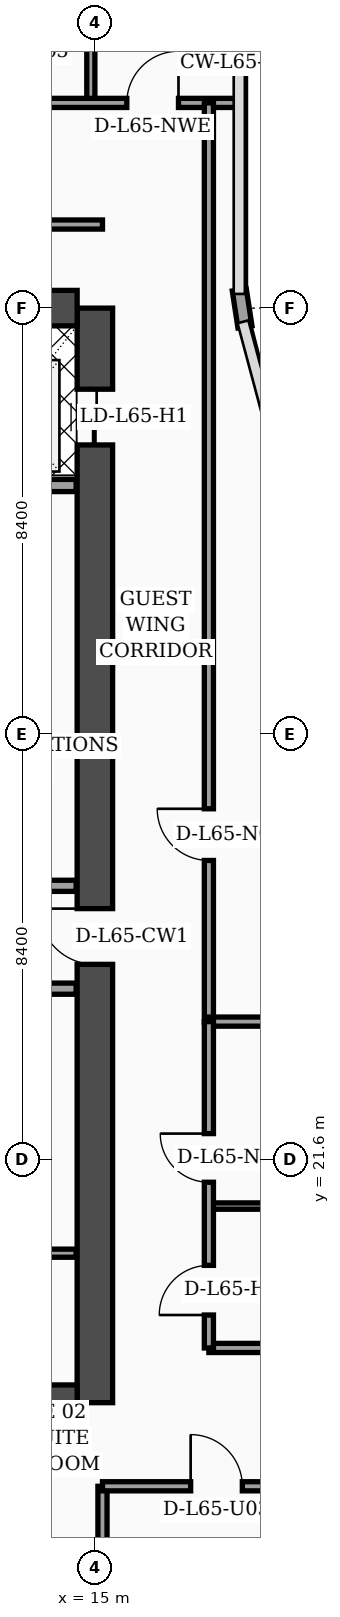
"""IFC4 building model, lengths in metres.
Left out: names, types, materials, properties, quantities, classifications, styles, units other than length and angle.
Written with IfcOpenShell. Run it as: python <this file> out.ifc"""

import sys

from ifc_helpers import new_model, si_unit, direction, frame, frame_2d, origin, place, context, subcontext, project, spatial, rectangle, extrude, element, fill, save


model = new_model("IFC4")
c1 = context("Model", 3, precision=1e-05, world=origin(), true_north=direction((0.0, 1.0)))
c2 = subcontext(c1, "Body", "Model", "MODEL_VIEW")
j1 = project(units=[si_unit("LENGTHUNIT", "METRE"), si_unit("PLANEANGLEUNIT", "RADIAN")], contexts=[c1])
p1 = place(None, origin())
s1 = spatial("IfcSite", under=j1, at=p1, CompositionType="ELEMENT")
p2 = place(p1, origin())
s2 = spatial("IfcBuilding", under=s1, at=p2, CompositionType="ELEMENT")
p3 = place(p2, frame((0.0, 0.0, 263.5)))
s3 = spatial("IfcBuildingStorey", under=s2, at=p3, CompositionType="ELEMENT", Elevation=263.5)
p4 = place(p3, frame((15.0, 16.8, 0.0), z_axis=(0.0, 0.0, 1.0), x_axis=(0.0, 1.0, 0.0)))
e1 = element("IfcWall", 1, at=p4, inside=s3, PredefinedType="SHEAR", context=c2, shape_type="SweptSolid", body=[
    extrude(rectangle(XDim=21.6, YDim=0.7, at=frame_2d((10.8, 0.0))), origin(), (0.0, 0.0, 1.0), 3.56),
])
p5 = place(p4, frame((8.65, 0.0, 0.0)))
e2 = element("IfcOpeningElement", 2, at=p5, cuts=e1, PredefinedType="OPENING", context=c2, shape_type="SweptSolid", body=[
    extrude(rectangle(XDim=1.1, YDim=2.2, at=frame_2d((0.55, 1.1))), frame((0.0, 0.36, 0.0), z_axis=(0.0, -1.0, 0.0), x_axis=(1.0, 0.0, 0.0)), (0.0, 0.0, 1.0), 0.72),
])
p6 = place(p4, frame((18.9, 0.0, 0.0)))
e3 = element("IfcOpeningElement", 3, at=p6, cuts=e1, PredefinedType="OPENING", context=c2, shape_type="SweptSolid", body=[
    extrude(rectangle(XDim=1.1, YDim=2.2, at=frame_2d((0.55, 1.1))), frame((0.0, 0.36, 0.0), z_axis=(0.0, -1.0, 0.0), x_axis=(1.0, 0.0, 0.0)), (0.0, 0.0, 1.0), 0.72),
])
p7 = place(p3, frame((4.55, 38.4, 0.0), z_axis=(0.0, 0.0, 1.0), x_axis=(1.0, 0.0, 0.0)))
e4 = element("IfcWall", 4, at=p7, inside=s3, PredefinedType="SHEAR", context=c2, shape_type="SweptSolid", body=[
    extrude(rectangle(XDim=10.1, YDim=0.7, at=frame_2d((5.05, 0.0))), origin(), (0.0, 0.0, 1.0), 3.56),
])
p8 = place(p7, frame((5.75, 0.0, 0.0)))
e5 = element("IfcOpeningElement", 5, at=p8, cuts=e4, PredefinedType="OPENING", context=c2, shape_type="SweptSolid", body=[
    extrude(rectangle(XDim=1.1, YDim=2.2, at=frame_2d((0.55, 1.1))), frame((0.0, 0.36, 0.0), z_axis=(0.0, -1.0, 0.0), x_axis=(1.0, 0.0, 0.0)), (0.0, 0.0, 1.0), 0.72),
])
p9 = place(p3, frame((4.55, 16.8, 0.0), z_axis=(0.0, 0.0, 1.0), x_axis=(1.0, 0.0, 0.0)))
e6 = element("IfcWall", 6, at=p9, inside=s3, PredefinedType="SHEAR", context=c2, shape_type="SweptSolid", body=[
    extrude(rectangle(XDim=10.1, YDim=0.7, at=frame_2d((5.05, 0.0))), origin(), (0.0, 0.0, 1.0), 3.56),
])
p10 = place(p3, frame((17.962, 38.03, 0.0), z_axis=(0.0, 0.0, 1.0), x_axis=(-0.15141125477, 0.988470855377, 0.0)))
e7 = element("IfcWall", 7, at=p10, inside=s3, PredefinedType="SOLIDWALL", context=c2, shape_type="SweptSolid", body=[
    extrude(rectangle(XDim=0.739, YDim=0.28, at=frame_2d((0.369, 0.0))), origin(), (0.0, 0.0, 1.0), 3.56),
])
p11 = place(p3, frame((9.68, 19.75, 0.0), z_axis=(0.0, 0.0, 1.0), x_axis=(1.0, 0.0, 0.0)))
e8 = element("IfcWall", 8, at=p11, inside=s3, PredefinedType="PARTITIONING", context=c2, shape_type="SweptSolid", body=[
    extrude(rectangle(XDim=4.95, YDim=0.16, at=frame_2d((2.475, 0.0))), origin(), (0.0, 0.0, 1.0), 3.56),
])
p12 = place(p11, frame((1.1, 0.0, 0.0)))
e9 = element("IfcOpeningElement", 9, at=p12, cuts=e8, PredefinedType="OPENING", context=c2, shape_type="SweptSolid", body=[
    extrude(rectangle(XDim=0.98, YDim=2.15, at=frame_2d((0.49, 1.075))), frame((0.0, 0.09, 0.0), z_axis=(0.0, -1.0, 0.0), x_axis=(1.0, 0.0, 0.0)), (0.0, 0.0, 1.0), 0.18),
])
p13 = place(p3, frame((9.68, 24.97, 0.0), z_axis=(0.0, 0.0, 1.0), x_axis=(1.0, 0.0, 0.0)))
e10 = element("IfcWall", 10, at=p13, inside=s3, PredefinedType="SOLIDWALL", context=c2, shape_type="SweptSolid", body=[
    extrude(rectangle(XDim=4.95, YDim=0.22, at=frame_2d((2.475, 0.0))), origin(), (0.0, 0.0, 1.0), 2.99),
])
p14 = place(p13, frame((0.9, 0.0, 0.0)))
e11 = element("IfcOpeningElement", 11, at=p14, cuts=e10, PredefinedType="OPENING", context=c2, shape_type="SweptSolid", body=[
    extrude(rectangle(XDim=0.98, YDim=2.15, at=frame_2d((0.49, 1.075))), frame((0.0, 0.12, 0.0), z_axis=(0.0, -1.0, 0.0), x_axis=(1.0, 0.0, 0.0)), (0.0, 0.0, 1.0), 0.24),
])
p15 = place(p3, frame((12.25, 27.0, 0.0), z_axis=(0.0, 0.0, 1.0), x_axis=(1.0, 0.0, 0.0)))
e12 = element("IfcWall", 12, at=p15, inside=s3, PredefinedType="SOLIDWALL", context=c2, shape_type="SweptSolid", body=[
    extrude(rectangle(XDim=2.38, YDim=0.22, at=frame_2d((1.19, 0.0))), origin(), (0.0, 0.0, 1.0), 3.56),
])
p16 = place(p3, frame((12.25, 29.8, 0.0), z_axis=(0.0, 0.0, 1.0), x_axis=(1.0, 0.0, 0.0)))
e13 = element("IfcWall", 13, at=p16, inside=s3, PredefinedType="PARTITIONING", context=c2, shape_type="SweptSolid", body=[
    extrude(rectangle(XDim=2.38, YDim=0.16, at=frame_2d((1.19, 0.0))), origin(), (0.0, 0.0, 1.0), 3.56),
])
p17 = place(p16, frame((0.55, 0.0, 0.0)))
e14 = element("IfcOpeningElement", 14, at=p17, cuts=e13, PredefinedType="OPENING", context=c2, shape_type="SweptSolid", body=[
    extrude(rectangle(XDim=0.98, YDim=2.15, at=frame_2d((0.49, 1.075))), frame((0.0, 0.09, 0.0), z_axis=(0.0, -1.0, 0.0), x_axis=(1.0, 0.0, 0.0)), (0.0, 0.0, 1.0), 0.18),
])
p18 = place(p3, frame((9.66, 34.9, 0.0), z_axis=(0.0, 0.0, 1.0), x_axis=(1.0, 0.0, 0.0)))
e15 = element("IfcWall", 15, at=p18, inside=s3, PredefinedType="SOLIDWALL", context=c2, shape_type="SweptSolid", body=[
    extrude(rectangle(XDim=4.97, YDim=0.24, at=frame_2d((2.485, 0.0))), origin(), (0.0, 0.0, 1.0), 3.56),
])
p19 = place(p3, frame((15.15, 2.44, 0.0), z_axis=(0.0, 0.0, 1.0), x_axis=(0.0, 1.0, 0.0)))
e16 = element("IfcWall", 16, at=p19, inside=s3, PredefinedType="PARTITIONING", context=c2, shape_type="SweptSolid", body=[
    extrude(rectangle(XDim=12.71, YDim=0.18, at=frame_2d((6.355, 0.0))), origin(), (0.0, 0.0, 1.0), 3.09),
])
p20 = place(p3, frame((15.15, 15.15, 0.0), z_axis=(0.0, 0.0, 1.0), x_axis=(1.0, 0.0, 0.0)))
e17 = element("IfcWall", 17, at=p20, inside=s3, PredefinedType="PARTITIONING", context=c2, shape_type="SweptSolid", body=[
    extrude(rectangle(XDim=6.45, YDim=0.18, at=frame_2d((3.225, 0.0))), origin(), (0.0, 0.0, 1.0), 2.59),
])
p21 = place(p20, frame((1.74, 0.0, 0.0)))
e18 = element("IfcOpeningElement", 18, at=p21, cuts=e17, PredefinedType="OPENING", context=c2, shape_type="SweptSolid", body=[
    extrude(rectangle(XDim=1.02, YDim=2.2, at=frame_2d((0.51, 1.1))), frame((0.0, 0.1, 0.0), z_axis=(0.0, -1.0, 0.0), x_axis=(1.0, 0.0, 0.0)), (0.0, 0.0, 1.0), 0.2),
])
p22 = place(p3, frame((14.92, 42.45, 0.0), z_axis=(0.0, 0.0, 1.0), x_axis=(0.0, 1.0, 0.0)))
e19 = element("IfcWall", 19, at=p22, inside=s3, PredefinedType="PARTITIONING", context=c2, shape_type="SweptSolid", body=[
    extrude(rectangle(XDim=5.35, YDim=0.16, at=frame_2d((2.675, 0.0))), origin(), (0.0, 0.0, 1.0), 3.09),
])
p23 = place(p3, frame((0.08, 42.45, 0.0), z_axis=(0.0, 0.0, 1.0), x_axis=(1.0, 0.0, 0.0)))
e20 = element("IfcWall", 20, at=p23, inside=s3, PredefinedType="PARTITIONING", context=c2, shape_type="SweptSolid", body=[
    extrude(rectangle(XDim=17.77, YDim=0.18, at=frame_2d((8.885, 0.0))), origin(), (0.0, 0.0, 1.0), 2.99),
])
p24 = place(p23, frame((0.9, 0.0, 0.0)))
e21 = element("IfcOpeningElement", 21, at=p24, cuts=e20, PredefinedType="OPENING", context=c2, shape_type="SweptSolid", body=[
    extrude(rectangle(XDim=1.02, YDim=2.2, at=frame_2d((0.51, 1.1))), frame((0.0, 0.1, 0.0), z_axis=(0.0, -1.0, 0.0), x_axis=(1.0, 0.0, 0.0)), (0.0, 0.0, 1.0), 0.2),
])
p25 = place(p23, frame((4.57, 0.0, 0.0)))
e22 = element("IfcOpeningElement", 22, at=p25, cuts=e20, PredefinedType="OPENING", context=c2, shape_type="SweptSolid", body=[
    extrude(rectangle(XDim=1.02, YDim=2.2, at=frame_2d((0.51, 1.1))), frame((0.0, 0.1, 0.0), z_axis=(0.0, -1.0, 0.0), x_axis=(1.0, 0.0, 0.0)), (0.0, 0.0, 1.0), 0.2),
])
p26 = place(p23, frame((10.46, 0.0, 0.0)))
e23 = element("IfcOpeningElement", 23, at=p26, cuts=e20, PredefinedType="OPENING", context=c2, shape_type="SweptSolid", body=[
    extrude(rectangle(XDim=1.02, YDim=2.2, at=frame_2d((0.51, 1.1))), frame((0.0, 0.1, 0.0), z_axis=(0.0, -1.0, 0.0), x_axis=(1.0, 0.0, 0.0)), (0.0, 0.0, 1.0), 0.2),
])
p27 = place(p23, frame((15.55, 0.0, 0.0)))
e24 = element("IfcOpeningElement", 24, at=p27, cuts=e20, PredefinedType="OPENING", context=c2, shape_type="SweptSolid", body=[
    extrude(rectangle(XDim=1.02, YDim=2.2, at=frame_2d((0.51, 1.1))), frame((0.0, 0.1, 0.0), z_axis=(0.0, -1.0, 0.0), x_axis=(1.0, 0.0, 0.0)), (0.0, 0.0, 1.0), 0.2),
])
p28 = place(p3, frame((17.25, 24.3, 0.0), z_axis=(0.0, 0.0, 1.0), x_axis=(0.0, 1.0, 0.0)))
e25 = element("IfcWall", 25, at=p28, inside=s3, PredefinedType="PARTITIONING", context=c2, shape_type="SweptSolid", body=[
    extrude(rectangle(XDim=18.15, YDim=0.18, at=frame_2d((9.075, 0.0))), origin(), (0.0, 0.0, 1.0), 2.99),
])
p29 = place(p28, frame((3.2, 0.0, 0.0)))
e26 = element("IfcOpeningElement", 26, at=p29, cuts=e25, PredefinedType="OPENING", context=c2, shape_type="SweptSolid", body=[
    extrude(rectangle(XDim=1.02, YDim=2.2, at=frame_2d((0.51, 1.1))), frame((0.0, 0.1, 0.0), z_axis=(0.0, -1.0, 0.0), x_axis=(1.0, 0.0, 0.0)), (0.0, 0.0, 1.0), 0.2),
])
p30 = place(p3, frame((3.83, 40.05, 0.0), z_axis=(0.0, 0.0, 1.0), x_axis=(1.0, 0.0, 0.0)))
e27 = element("IfcWall", 27, at=p30, inside=s3, PredefinedType="PARTITIONING", context=c2, shape_type="SweptSolid", body=[
    extrude(rectangle(XDim=11.32, YDim=0.18, at=frame_2d((5.66, 0.0))), origin(), (0.0, 0.0, 1.0), 2.99),
])
p31 = place(p3, frame((17.25, 17.88, 0.0), z_axis=(0.0, 0.0, 1.0), x_axis=(1.0, 0.0, 0.0)))
e28 = element("IfcWall", 28, at=p31, inside=s3, PredefinedType="PARTITIONING", context=c2, shape_type="SweptSolid", body=[
    extrude(rectangle(XDim=4.3, YDim=0.18, at=frame_2d((2.15, 0.0))), origin(), (0.0, 0.0, 1.0), 3.56),
])
p32 = place(p3, frame((17.25, 20.68, 0.0), z_axis=(0.0, 0.0, 1.0), x_axis=(1.0, 0.0, 0.0)))
e29 = element("IfcWall", 29, at=p32, inside=s3, PredefinedType="PARTITIONING", context=c2, shape_type="SweptSolid", body=[
    extrude(rectangle(XDim=4.3, YDim=0.125, at=frame_2d((2.15, 0.0))), origin(), (0.0, 0.0, 1.0), 3.56),
])
p33 = place(p3, frame((17.25, 24.32, 0.0), z_axis=(0.0, 0.0, 1.0), x_axis=(1.0, 0.0, 0.0)))
e30 = element("IfcWall", 30, at=p33, inside=s3, PredefinedType="PARTITIONING", context=c2, shape_type="SweptSolid", body=[
    extrude(rectangle(XDim=4.35, YDim=0.18, at=frame_2d((2.175, 0.0))), origin(), (0.0, 0.0, 1.0), 3.56),
])
p34 = place(p3, frame((17.25, 17.88, 0.0), z_axis=(0.0, 0.0, 1.0), x_axis=(0.0, 1.0, 0.0)))
e31 = element("IfcWall", 31, at=p34, inside=s3, PredefinedType="PARTITIONING", context=c2, shape_type="SweptSolid", body=[
    extrude(rectangle(XDim=6.44, YDim=0.18, at=frame_2d((3.22, 0.0))), origin(), (0.0, 0.0, 1.0), 3.56),
])
p35 = place(p34, frame((0.65, 0.0, 0.0)))
e32 = element("IfcOpeningElement", 32, at=p35, cuts=e31, PredefinedType="OPENING", context=c2, shape_type="SweptSolid", body=[
    extrude(rectangle(XDim=0.98, YDim=2.15, at=frame_2d((0.49, 1.075))), frame((0.0, 0.1, 0.0), z_axis=(0.0, -1.0, 0.0), x_axis=(1.0, 0.0, 0.0)), (0.0, 0.0, 1.0), 0.2),
])
p36 = place(p34, frame((3.27, 0.0, 0.0)))
e33 = element("IfcOpeningElement", 33, at=p36, cuts=e31, PredefinedType="OPENING", context=c2, shape_type="SweptSolid", body=[
    extrude(rectangle(XDim=0.96, YDim=2.2, at=frame_2d((0.48, 1.1))), frame((0.0, 0.1, 0.0), z_axis=(0.0, -1.0, 0.0), x_axis=(1.0, 0.0, 0.0)), (0.0, 0.0, 1.0), 0.2),
])
p37 = place(p21, origin())
e34 = element("IfcDoor", 34, at=p37, inside=s3, OperationType="SINGLE_SWING_LEFT", PredefinedType="DOOR", context=c2, shape_type="SweptSolid", body=[
    extrude(rectangle(XDim=1.02, YDim=2.2, at=frame_2d((0.51, 1.1))), frame((0.0, 0.025, 0.0), z_axis=(0.0, -1.0, 0.0), x_axis=(1.0, 0.0, 0.0)), (0.0, 0.0, 1.0), 0.05),
])
fill(e18, e34)
p38 = place(p27, origin())
e35 = element("IfcDoor", 35, at=p38, inside=s3, OperationType="SINGLE_SWING_RIGHT", PredefinedType="DOOR", context=c2, shape_type="SweptSolid", body=[
    extrude(rectangle(XDim=1.02, YDim=2.2, at=frame_2d((0.51, 1.1))), frame((0.0, 0.025, 0.0), z_axis=(0.0, -1.0, 0.0), x_axis=(1.0, 0.0, 0.0)), (0.0, 0.0, 1.0), 0.05),
])
fill(e24, e35)
p39 = place(p29, origin())
e36 = element("IfcDoor", 36, at=p39, inside=s3, OperationType="SINGLE_SWING_RIGHT", PredefinedType="DOOR", context=c2, shape_type="SweptSolid", body=[
    extrude(rectangle(XDim=1.02, YDim=2.2, at=frame_2d((0.51, 1.1))), frame((0.0, 0.025, 0.0), z_axis=(0.0, -1.0, 0.0), x_axis=(1.0, 0.0, 0.0)), (0.0, 0.0, 1.0), 0.05),
])
fill(e26, e36)
p40 = place(p35, origin())
e37 = element("IfcDoor", 37, at=p40, inside=s3, OperationType="SINGLE_SWING_LEFT", PredefinedType="DOOR", context=c2, shape_type="SweptSolid", body=[
    extrude(rectangle(XDim=0.98, YDim=2.15, at=frame_2d((0.49, 1.075))), frame((0.0, 0.025, 0.0), z_axis=(0.0, -1.0, 0.0), x_axis=(1.0, 0.0, 0.0)), (0.0, 0.0, 1.0), 0.05),
])
fill(e32, e37)
p41 = place(p36, origin())
e38 = element("IfcDoor", 38, at=p41, inside=s3, OperationType="SINGLE_SWING_RIGHT", PredefinedType="DOOR", context=c2, shape_type="SweptSolid", body=[
    extrude(rectangle(XDim=0.96, YDim=2.2, at=frame_2d((0.48, 1.1))), frame((0.0, 0.025, 0.0), z_axis=(0.0, -1.0, 0.0), x_axis=(1.0, 0.0, 0.0)), (0.0, 0.0, 1.0), 0.05),
])
fill(e33, e38)
p42 = place(p5, origin())
e39 = element("IfcDoor", 39, at=p42, inside=s3, OperationType="SINGLE_SWING_RIGHT", PredefinedType="DOOR", context=c2, shape_type="SweptSolid", body=[
    extrude(rectangle(XDim=1.1, YDim=2.2, at=frame_2d((0.55, 1.1))), frame((0.0, 0.025, 0.0), z_axis=(0.0, -1.0, 0.0), x_axis=(1.0, 0.0, 0.0)), (0.0, 0.0, 1.0), 0.05),
])
fill(e2, e39)
p43 = place(p6, origin())
e40 = element("IfcDoor", 40, at=p43, inside=s3, OperationType="DOUBLE_DOOR_SLIDING", PredefinedType="DOOR", context=c2, shape_type="SweptSolid", body=[
    extrude(rectangle(XDim=1.1, YDim=2.2, at=frame_2d((0.55, 1.1))), frame((0.0, 0.025, 0.0), z_axis=(0.0, -1.0, 0.0), x_axis=(1.0, 0.0, 0.0)), (0.0, 0.0, 1.0), 0.05),
])
fill(e3, e40)
save(model, sys.argv[1])
